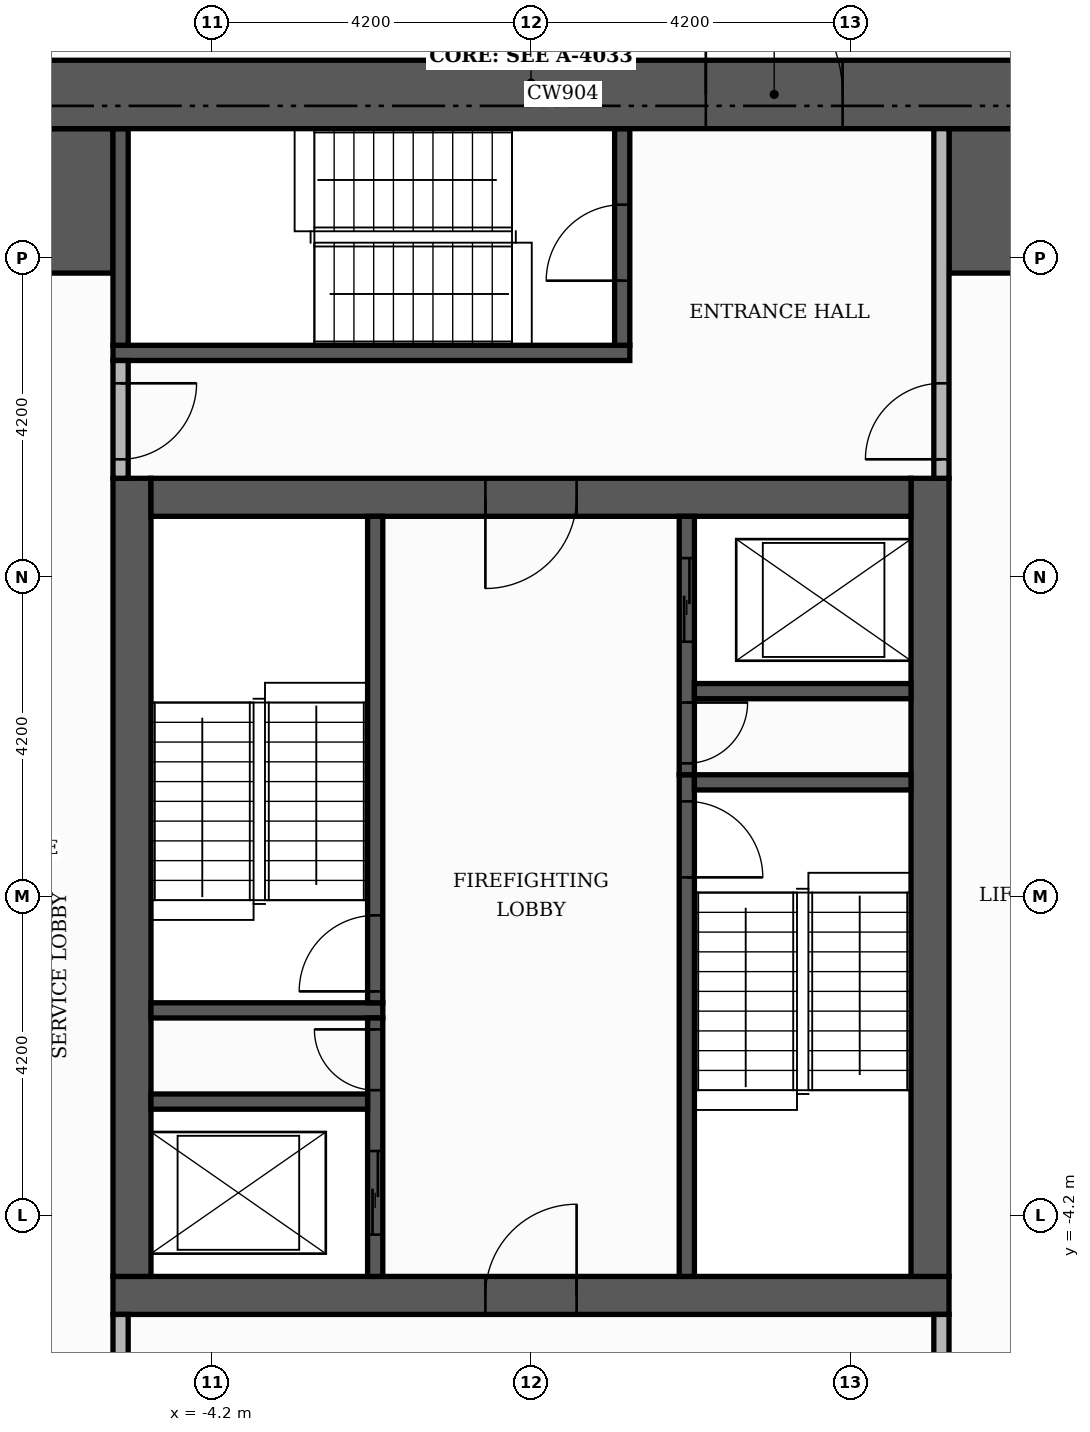
"""IFC4 building model, lengths in metres.
Left out: names, types, materials, properties, quantities, classifications, styles, units other than length and angle.
Written with IfcOpenShell. Run it as: python <this file> out.ifc"""

import sys

from ifc_helpers import new_model, si_unit, direction, frame, frame_2d, origin, place, context, subcontext, project, spatial, rectangle, extrude, element, fill, save


model = new_model("IFC4")
c1 = context("Model", 3, precision=1e-05, world=origin(), true_north=direction((0.0, 1.0)))
c2 = subcontext(c1, "Body", "Model", "MODEL_VIEW")
j1 = project(units=[si_unit("LENGTHUNIT", "METRE"), si_unit("PLANEANGLEUNIT", "RADIAN")], contexts=[c1])
p1 = place(None, origin())
s1 = spatial("IfcSite", under=j1, at=p1, CompositionType="ELEMENT")
p2 = place(p1, origin())
s2 = spatial("IfcBuilding", under=s1, at=p2, CompositionType="ELEMENT")
p3 = place(p2, frame((0.0, 0.0, 200.1)))
s3 = spatial("IfcBuildingStorey", under=s2, at=p3, CompositionType="ELEMENT", Elevation=200.1)
p4 = place(p3, frame((-5.5, -5.25, 0.0), z_axis=(0.0, 0.0, 1.0), x_axis=(1.0, 0.0, 0.0)))
e1 = element("IfcWall", 1, at=p4, inside=s3, PredefinedType="SHEAR", context=c2, shape_type="SweptSolid", body=[
    extrude(rectangle(XDim=11.0, YDim=0.5, at=frame_2d((5.5, 0.0))), origin(), (0.0, 0.0, 1.0), 3.48),
])
p5 = place(p4, frame((4.9, 0.0, 0.0)))
e2 = element("IfcOpeningElement", 2, at=p5, cuts=e1, PredefinedType="OPENING", context=c2, shape_type="SweptSolid", body=[
    extrude(rectangle(XDim=1.2, YDim=2.1, at=frame_2d((0.6, 1.05))), frame((0.0, 0.26, 0.0), z_axis=(0.0, -1.0, 0.0), x_axis=(1.0, 0.0, 0.0)), (0.0, 0.0, 1.0), 0.52),
])
for number, where, z_axis, x_axis in (
    (3, (-5.25, -5.0, 0.0), (0.0, 0.0, 1.0), (0.0, 1.0, 0.0)),
    (4, (5.25, -5.0, 0.0), (0.0, 0.0, 1.0), (0.0, 1.0, 0.0)),
):
    element("IfcWall", number, at=place(p3, frame(where, z_axis=z_axis, x_axis=x_axis)), inside=s3, PredefinedType="SHEAR", context=c2, shape_type="SweptSolid", body=[
        extrude(rectangle(XDim=10.5, YDim=0.5, at=frame_2d((5.25, 0.0))), origin(), (0.0, 0.0, 1.0), 3.48),
    ])
p6 = place(p3, frame((-5.0, 5.25, 0.0), z_axis=(0.0, 0.0, 1.0), x_axis=(1.0, 0.0, 0.0)))
e5 = element("IfcWall", 5, at=p6, inside=s3, PredefinedType="SHEAR", context=c2, shape_type="SweptSolid", body=[
    extrude(rectangle(XDim=10.0, YDim=0.5, at=frame_2d((5.0, 0.0))), origin(), (0.0, 0.0, 1.0), 3.48),
])
p7 = place(p6, frame((4.4, 0.0, 0.0)))
e6 = element("IfcOpeningElement", 6, at=p7, cuts=e5, PredefinedType="OPENING", context=c2, shape_type="SweptSolid", body=[
    extrude(rectangle(XDim=1.2, YDim=2.1, at=frame_2d((0.6, 1.05))), frame((0.0, 0.26, 0.0), z_axis=(0.0, -1.0, 0.0), x_axis=(1.0, 0.0, 0.0)), (0.0, 0.0, 1.0), 0.52),
])
for number, where, z_axis, x_axis in (
    (7, (-10.1, 9.15, 0.0), (0.0, 0.0, 1.0), (1.0, 0.0, 0.0)),
    (8, (5.5, 9.15, 0.0), (0.0, 0.0, 1.0), (1.0, 0.0, 0.0)),
):
    element("IfcWall", number, at=place(p3, frame(where, z_axis=z_axis, x_axis=x_axis)), inside=s3, PredefinedType="SHEAR", context=c2, shape_type="SweptSolid", body=[
        extrude(rectangle(XDim=4.6, YDim=1.9, at=frame_2d((2.3, 0.0))), origin(), (0.0, 0.0, 1.0), 3.48),
    ])
p8 = place(p3, frame((2.05, -5.0, 0.0), z_axis=(0.0, 0.0, 1.0), x_axis=(0.0, 1.0, 0.0)))
e9 = element("IfcWall", 9, at=p8, inside=s3, PredefinedType="SHEAR", context=c2, shape_type="SweptSolid", body=[
    extrude(rectangle(XDim=6.6, YDim=0.2, at=frame_2d((3.3, 0.0))), origin(), (0.0, 0.0, 1.0), 3.48),
])
p9 = place(p8, frame((5.25, 0.0, 0.0)))
e10 = element("IfcOpeningElement", 10, at=p9, cuts=e9, PredefinedType="OPENING", context=c2, shape_type="SweptSolid", body=[
    extrude(rectangle(XDim=1.0, YDim=2.1, at=frame_2d((0.5, 1.05))), frame((0.0, 0.11, 0.0), z_axis=(0.0, -1.0, 0.0), x_axis=(1.0, 0.0, 0.0)), (0.0, 0.0, 1.0), 0.22),
])
p10 = place(p3, frame((-5.0, -1.5, 0.0), z_axis=(0.0, 0.0, 1.0), x_axis=(1.0, 0.0, 0.0)))
e11 = element("IfcWall", 11, at=p10, inside=s3, PredefinedType="SHEAR", context=c2, shape_type="SweptSolid", body=[
    extrude(rectangle(XDim=3.05, YDim=0.2, at=frame_2d((1.525, 0.0))), origin(), (0.0, 0.0, 1.0), 3.48),
])
p11 = place(p3, frame((-2.05, -1.4, 0.0), z_axis=(0.0, 0.0, 1.0), x_axis=(0.0, 1.0, 0.0)))
e12 = element("IfcWall", 12, at=p11, inside=s3, PredefinedType="SHEAR", context=c2, shape_type="SweptSolid", body=[
    extrude(rectangle(XDim=6.4, YDim=0.2, at=frame_2d((3.2, 0.0))), origin(), (0.0, 0.0, 1.0), 3.48),
])
p12 = place(p11, frame((0.15, 0.0, 0.0)))
e13 = element("IfcOpeningElement", 13, at=p12, cuts=e12, PredefinedType="OPENING", context=c2, shape_type="SweptSolid", body=[
    extrude(rectangle(XDim=1.0, YDim=2.1, at=frame_2d((0.5, 1.05))), frame((0.0, 0.11, 0.0), z_axis=(0.0, -1.0, 0.0), x_axis=(1.0, 0.0, 0.0)), (0.0, 0.0, 1.0), 0.22),
])
p13 = place(p3, frame((2.15, 1.5, 0.0), z_axis=(0.0, 0.0, 1.0), x_axis=(1.0, 0.0, 0.0)))
e14 = element("IfcWall", 14, at=p13, inside=s3, PredefinedType="SHEAR", context=c2, shape_type="SweptSolid", body=[
    extrude(rectangle(XDim=2.85, YDim=0.2, at=frame_2d((1.425, 0.0))), origin(), (0.0, 0.0, 1.0), 3.48),
])
p14 = place(p3, frame((-5.5, 7.15, 0.0), z_axis=(0.0, 0.0, 1.0), x_axis=(1.0, 0.0, 0.0)))
e15 = element("IfcWall", 15, at=p14, inside=s3, PredefinedType="SHEAR", context=c2, shape_type="SweptSolid", body=[
    extrude(rectangle(XDim=6.8, YDim=0.2, at=frame_2d((3.4, 0.0))), origin(), (0.0, 0.0, 1.0), 3.48),
])
p15 = place(p3, frame((-5.4, 7.25, 0.0), z_axis=(0.0, 0.0, 1.0), x_axis=(0.0, 1.0, 0.0)))
e16 = element("IfcWall", 16, at=p15, inside=s3, PredefinedType="SHEAR", context=c2, shape_type="SweptSolid", body=[
    extrude(rectangle(XDim=2.85, YDim=0.2, at=frame_2d((1.425, 0.0))), origin(), (0.0, 0.0, 1.0), 3.48),
])
p16 = place(p3, frame((1.2, 7.25, 0.0), z_axis=(0.0, 0.0, 1.0), x_axis=(0.0, 1.0, 0.0)))
e17 = element("IfcWall", 17, at=p16, inside=s3, PredefinedType="SHEAR", context=c2, shape_type="SweptSolid", body=[
    extrude(rectangle(XDim=2.85, YDim=0.2, at=frame_2d((1.425, 0.0))), origin(), (0.0, 0.0, 1.0), 3.48),
])
p17 = place(p16, frame((0.85, 0.0, 0.0)))
e18 = element("IfcOpeningElement", 18, at=p17, cuts=e17, PredefinedType="OPENING", context=c2, shape_type="SweptSolid", body=[
    extrude(rectangle(XDim=1.0, YDim=2.1, at=frame_2d((0.5, 1.05))), frame((0.0, 0.11, 0.0), z_axis=(0.0, -1.0, 0.0), x_axis=(1.0, 0.0, 0.0)), (0.0, 0.0, 1.0), 0.22),
])
p18 = place(p3, frame((-2.05, -5.0, 0.0), z_axis=(0.0, 0.0, 1.0), x_axis=(0.0, 1.0, 0.0)))
e19 = element("IfcWall", 19, at=p18, inside=s3, PredefinedType="SHEAR", context=c2, shape_type="SweptSolid", body=[
    extrude(rectangle(XDim=3.4, YDim=0.2, at=frame_2d((1.7, 0.0))), origin(), (0.0, 0.0, 1.0), 3.48),
])
p19 = place(p18, frame((0.55, 0.0, 0.0)))
e20 = element("IfcOpeningElement", 20, at=p19, cuts=e19, PredefinedType="OPENING", context=c2, shape_type="SweptSolid", body=[
    extrude(rectangle(XDim=1.1, YDim=2.1, at=frame_2d((0.55, 1.05))), frame((0.0, 0.11, 0.0), z_axis=(0.0, -1.0, 0.0), x_axis=(1.0, 0.0, 0.0)), (0.0, 0.0, 1.0), 0.22),
])
p20 = place(p18, frame((2.45, 0.0, 0.0)))
e21 = element("IfcOpeningElement", 21, at=p20, cuts=e19, PredefinedType="OPENING", context=c2, shape_type="SweptSolid", body=[
    extrude(rectangle(XDim=0.8, YDim=2.1, at=frame_2d((0.4, 1.05))), frame((0.0, 0.11, 0.0), z_axis=(0.0, -1.0, 0.0), x_axis=(1.0, 0.0, 0.0)), (0.0, 0.0, 1.0), 0.22),
])
p21 = place(p3, frame((-5.0, -2.7, 0.0), z_axis=(0.0, 0.0, 1.0), x_axis=(1.0, 0.0, 0.0)))
e22 = element("IfcWall", 22, at=p21, inside=s3, PredefinedType="SHEAR", context=c2, shape_type="SweptSolid", body=[
    extrude(rectangle(XDim=2.85, YDim=0.2, at=frame_2d((1.425, 0.0))), origin(), (0.0, 0.0, 1.0), 3.48),
])
p22 = place(p3, frame((2.05, 1.6, 0.0), z_axis=(0.0, 0.0, 1.0), x_axis=(0.0, 1.0, 0.0)))
e23 = element("IfcWall", 23, at=p22, inside=s3, PredefinedType="SHEAR", context=c2, shape_type="SweptSolid", body=[
    extrude(rectangle(XDim=3.4, YDim=0.2, at=frame_2d((1.7, 0.0))), origin(), (0.0, 0.0, 1.0), 3.48),
])
p23 = place(p22, frame((1.75, 0.0, 0.0)))
e24 = element("IfcOpeningElement", 24, at=p23, cuts=e23, PredefinedType="OPENING", context=c2, shape_type="SweptSolid", body=[
    extrude(rectangle(XDim=1.1, YDim=2.1, at=frame_2d((0.55, 1.05))), frame((0.0, 0.11, 0.0), z_axis=(0.0, -1.0, 0.0), x_axis=(1.0, 0.0, 0.0)), (0.0, 0.0, 1.0), 0.22),
])
p24 = place(p22, frame((0.15, 0.0, 0.0)))
e25 = element("IfcOpeningElement", 25, at=p24, cuts=e23, PredefinedType="OPENING", context=c2, shape_type="SweptSolid", body=[
    extrude(rectangle(XDim=0.8, YDim=2.1, at=frame_2d((0.4, 1.05))), frame((0.0, 0.11, 0.0), z_axis=(0.0, -1.0, 0.0), x_axis=(1.0, 0.0, 0.0)), (0.0, 0.0, 1.0), 0.22),
])
p25 = place(p3, frame((2.15, 2.7, 0.0), z_axis=(0.0, 0.0, 1.0), x_axis=(1.0, 0.0, 0.0)))
e26 = element("IfcWall", 26, at=p25, inside=s3, PredefinedType="SHEAR", context=c2, shape_type="SweptSolid", body=[
    extrude(rectangle(XDim=2.85, YDim=0.2, at=frame_2d((1.425, 0.0))), origin(), (0.0, 0.0, 1.0), 3.48),
])
p26 = place(p3, frame((-11.0, 10.55, 0.0), z_axis=(0.0, 0.0, 1.0), x_axis=(1.0, 0.0, 0.0)))
e27 = element("IfcWall", 27, at=p26, inside=s3, PredefinedType="SHEAR", context=c2, shape_type="SweptSolid", body=[
    extrude(rectangle(XDim=22.0, YDim=0.9, at=frame_2d((11.0, 0.0))), origin(), (0.0, 0.0, 1.0), 3.48),
])
p27 = place(p26, frame((13.3, 0.0, 0.0)))
e28 = element("IfcOpeningElement", 28, at=p27, cuts=e27, PredefinedType="OPENING", context=c2, shape_type="SweptSolid", body=[
    extrude(rectangle(XDim=1.8, YDim=2.2, at=frame_2d((0.9, 1.1))), frame((0.0, 0.46, 0.0), z_axis=(0.0, -1.0, 0.0), x_axis=(1.0, 0.0, 0.0)), (0.0, 0.0, 1.0), 0.92),
])
p28 = place(p3, frame((-5.4, -10.1, 0.0), z_axis=(0.0, 0.0, 1.0), x_axis=(0.0, 1.0, 0.0)))
e29 = element("IfcWall", 29, at=p28, inside=s3, PredefinedType="PARTITIONING", context=c2, shape_type="SweptSolid", body=[
    extrude(rectangle(XDim=4.6, YDim=0.2, at=frame_2d((2.3, 0.0))), origin(), (0.0, 0.0, 1.0), 3.48),
])
p29 = place(p28, frame((2.9, 0.0, 0.0)))
e30 = element("IfcOpeningElement", 30, at=p29, cuts=e29, PredefinedType="OPENING", context=c2, shape_type="SweptSolid", body=[
    extrude(rectangle(XDim=1.0, YDim=2.1, at=frame_2d((0.5, 1.05))), frame((0.0, 0.11, 0.0), z_axis=(0.0, -1.0, 0.0), x_axis=(1.0, 0.0, 0.0)), (0.0, 0.0, 1.0), 0.22),
])
p30 = place(p3, frame((5.4, -10.1, 0.0), z_axis=(0.0, 0.0, 1.0), x_axis=(0.0, 1.0, 0.0)))
e31 = element("IfcWall", 31, at=p30, inside=s3, PredefinedType="PARTITIONING", context=c2, shape_type="SweptSolid", body=[
    extrude(rectangle(XDim=4.6, YDim=0.2, at=frame_2d((2.3, 0.0))), origin(), (0.0, 0.0, 1.0), 3.48),
])
p31 = place(p30, frame((2.9, 0.0, 0.0)))
e32 = element("IfcOpeningElement", 32, at=p31, cuts=e31, PredefinedType="OPENING", context=c2, shape_type="SweptSolid", body=[
    extrude(rectangle(XDim=1.0, YDim=2.1, at=frame_2d((0.5, 1.05))), frame((0.0, 0.11, 0.0), z_axis=(0.0, -1.0, 0.0), x_axis=(1.0, 0.0, 0.0)), (0.0, 0.0, 1.0), 0.22),
])
p32 = place(p3, frame((-5.4, 5.5, 0.0), z_axis=(0.0, 0.0, 1.0), x_axis=(0.0, 1.0, 0.0)))
e33 = element("IfcWall", 33, at=p32, inside=s3, PredefinedType="PARTITIONING", context=c2, shape_type="SweptSolid", body=[
    extrude(rectangle(XDim=1.55, YDim=0.2, at=frame_2d((0.775, 0.0))), origin(), (0.0, 0.0, 1.0), 3.48),
])
p33 = place(p32, frame((0.25, 0.0, 0.0)))
e34 = element("IfcOpeningElement", 34, at=p33, cuts=e33, PredefinedType="OPENING", context=c2, shape_type="SweptSolid", body=[
    extrude(rectangle(XDim=1.0, YDim=2.1, at=frame_2d((0.5, 1.05))), frame((0.0, 0.11, 0.0), z_axis=(0.0, -1.0, 0.0), x_axis=(1.0, 0.0, 0.0)), (0.0, 0.0, 1.0), 0.22),
])
p34 = place(p3, frame((5.4, 5.5, 0.0), z_axis=(0.0, 0.0, 1.0), x_axis=(0.0, 1.0, 0.0)))
e35 = element("IfcWall", 35, at=p34, inside=s3, PredefinedType="PARTITIONING", context=c2, shape_type="SweptSolid", body=[
    extrude(rectangle(XDim=4.6, YDim=0.2, at=frame_2d((2.3, 0.0))), origin(), (0.0, 0.0, 1.0), 3.48),
])
p35 = place(p34, frame((0.25, 0.0, 0.0)))
e36 = element("IfcOpeningElement", 36, at=p35, cuts=e35, PredefinedType="OPENING", context=c2, shape_type="SweptSolid", body=[
    extrude(rectangle(XDim=1.0, YDim=2.1, at=frame_2d((0.5, 1.05))), frame((0.0, 0.11, 0.0), z_axis=(0.0, -1.0, 0.0), x_axis=(1.0, 0.0, 0.0)), (0.0, 0.0, 1.0), 0.22),
])
p36 = place(p23, origin())
e37 = element("IfcDoor", 37, at=p36, inside=s3, OperationType="SLIDING_TO_LEFT", PredefinedType="DOOR", context=c2, shape_type="SweptSolid", body=[
    extrude(rectangle(XDim=1.1, YDim=2.1, at=frame_2d((0.55, 1.05))), frame((0.0, 0.025, 0.0), z_axis=(0.0, -1.0, 0.0), x_axis=(1.0, 0.0, 0.0)), (0.0, 0.0, 1.0), 0.05),
])
fill(e24, e37)
p37 = place(p19, origin())
e38 = element("IfcDoor", 38, at=p37, inside=s3, OperationType="SLIDING_TO_LEFT", PredefinedType="DOOR", context=c2, shape_type="SweptSolid", body=[
    extrude(rectangle(XDim=1.1, YDim=2.1, at=frame_2d((0.55, 1.05))), frame((0.0, 0.025, 0.0), z_axis=(0.0, -1.0, 0.0), x_axis=(1.0, 0.0, 0.0)), (0.0, 0.0, 1.0), 0.05),
])
fill(e20, e38)
p38 = place(p12, origin())
e39 = element("IfcDoor", 39, at=p38, inside=s3, OperationType="SINGLE_SWING_LEFT", PredefinedType="DOOR", context=c2, shape_type="SweptSolid", body=[
    extrude(rectangle(XDim=1.0, YDim=2.1, at=frame_2d((0.5, 1.05))), frame((0.0, 0.025, 0.0), z_axis=(0.0, -1.0, 0.0), x_axis=(1.0, 0.0, 0.0)), (0.0, 0.0, 1.0), 0.05),
])
fill(e13, e39)
p39 = place(p9, frame((1.0, 0.0, 0.0), z_axis=(0.0, 0.0, 1.0), x_axis=(-1.0, 0.0, 0.0)))
e40 = element("IfcDoor", 40, at=p39, inside=s3, OperationType="SINGLE_SWING_LEFT", PredefinedType="DOOR", context=c2, shape_type="SweptSolid", body=[
    extrude(rectangle(XDim=1.0, YDim=2.1, at=frame_2d((0.5, 1.05))), frame((0.0, 0.025, 0.0), z_axis=(0.0, -1.0, 0.0), x_axis=(1.0, 0.0, 0.0)), (0.0, 0.0, 1.0), 0.05),
])
fill(e10, e40)
p40 = place(p24, frame((0.8, 0.0, 0.0), z_axis=(0.0, 0.0, 1.0), x_axis=(-1.0, 0.0, 0.0)))
e41 = element("IfcDoor", 41, at=p40, inside=s3, OperationType="SINGLE_SWING_RIGHT", PredefinedType="DOOR", context=c2, shape_type="SweptSolid", body=[
    extrude(rectangle(XDim=0.8, YDim=2.1, at=frame_2d((0.4, 1.05))), frame((0.0, 0.025, 0.0), z_axis=(0.0, -1.0, 0.0), x_axis=(1.0, 0.0, 0.0)), (0.0, 0.0, 1.0), 0.05),
])
fill(e25, e41)
p41 = place(p20, origin())
e42 = element("IfcDoor", 42, at=p41, inside=s3, OperationType="SINGLE_SWING_RIGHT", PredefinedType="DOOR", context=c2, shape_type="SweptSolid", body=[
    extrude(rectangle(XDim=0.8, YDim=2.1, at=frame_2d((0.4, 1.05))), frame((0.0, 0.025, 0.0), z_axis=(0.0, -1.0, 0.0), x_axis=(1.0, 0.0, 0.0)), (0.0, 0.0, 1.0), 0.05),
])
fill(e21, e42)
p42 = place(p7, frame((1.2, 0.0, 0.0), z_axis=(0.0, 0.0, 1.0), x_axis=(-1.0, 0.0, 0.0)))
e43 = element("IfcDoor", 43, at=p42, inside=s3, OperationType="SINGLE_SWING_LEFT", PredefinedType="DOOR", context=c2, shape_type="SweptSolid", body=[
    extrude(rectangle(XDim=1.2, YDim=2.1, at=frame_2d((0.6, 1.05))), frame((0.0, 0.025, 0.0), z_axis=(0.0, -1.0, 0.0), x_axis=(1.0, 0.0, 0.0)), (0.0, 0.0, 1.0), 0.05),
])
fill(e6, e43)
p43 = place(p5, origin())
e44 = element("IfcDoor", 44, at=p43, inside=s3, OperationType="SINGLE_SWING_RIGHT", PredefinedType="DOOR", context=c2, shape_type="SweptSolid", body=[
    extrude(rectangle(XDim=1.2, YDim=2.1, at=frame_2d((0.6, 1.05))), frame((0.0, 0.025, 0.0), z_axis=(0.0, -1.0, 0.0), x_axis=(1.0, 0.0, 0.0)), (0.0, 0.0, 1.0), 0.05),
])
fill(e2, e44)
p44 = place(p17, origin())
e45 = element("IfcDoor", 45, at=p44, inside=s3, OperationType="SINGLE_SWING_LEFT", PredefinedType="DOOR", context=c2, shape_type="SweptSolid", body=[
    extrude(rectangle(XDim=1.0, YDim=2.1, at=frame_2d((0.5, 1.05))), frame((0.0, 0.025, 0.0), z_axis=(0.0, -1.0, 0.0), x_axis=(1.0, 0.0, 0.0)), (0.0, 0.0, 1.0), 0.05),
])
fill(e18, e45)
p45 = place(p33, frame((1.0, 0.0, 0.0), z_axis=(0.0, 0.0, 1.0), x_axis=(-1.0, 0.0, 0.0)))
e46 = element("IfcDoor", 46, at=p45, inside=s3, OperationType="SINGLE_SWING_RIGHT", PredefinedType="DOOR", context=c2, shape_type="SweptSolid", body=[
    extrude(rectangle(XDim=1.0, YDim=2.1, at=frame_2d((0.5, 1.05))), frame((0.0, 0.025, 0.0), z_axis=(0.0, -1.0, 0.0), x_axis=(1.0, 0.0, 0.0)), (0.0, 0.0, 1.0), 0.05),
])
fill(e34, e46)
p46 = place(p35, origin())
e47 = element("IfcDoor", 47, at=p46, inside=s3, OperationType="SINGLE_SWING_LEFT", PredefinedType="DOOR", context=c2, shape_type="SweptSolid", body=[
    extrude(rectangle(XDim=1.0, YDim=2.1, at=frame_2d((0.5, 1.05))), frame((0.0, 0.025, 0.0), z_axis=(0.0, -1.0, 0.0), x_axis=(1.0, 0.0, 0.0)), (0.0, 0.0, 1.0), 0.05),
])
fill(e36, e47)
p47 = place(p27, origin())
e48 = element("IfcDoor", 48, at=p47, inside=s3, OperationType="DOUBLE_DOOR_SINGLE_SWING", PredefinedType="DOOR", context=c2, shape_type="SweptSolid", body=[
    extrude(rectangle(XDim=1.8, YDim=2.2, at=frame_2d((0.9, 1.1))), frame((0.0, 0.025, 0.0), z_axis=(0.0, -1.0, 0.0), x_axis=(1.0, 0.0, 0.0)), (0.0, 0.0, 1.0), 0.05),
])
fill(e28, e48)
save(model, sys.argv[1])
